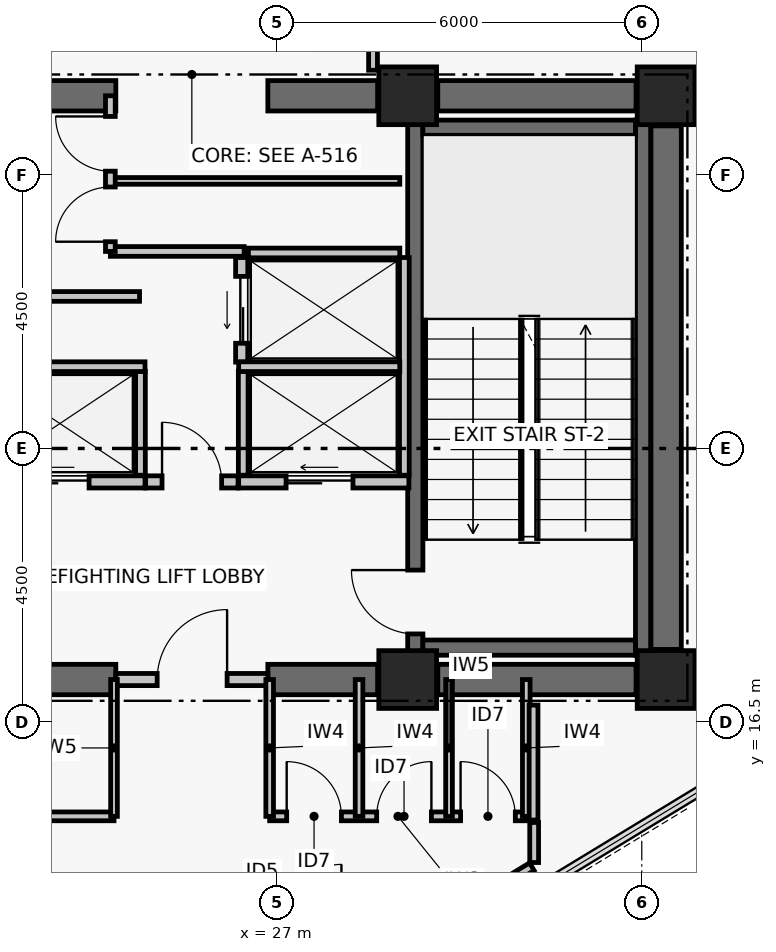
"""IFC4 building model, lengths in metres.
Left out: names, types, materials, properties, quantities, classifications, styles, units other than length and angle.
Written with IfcOpenShell. Run it as: python <this file> out.ifc"""

import sys

from ifc_helpers import new_model, si_unit, direction, frame, frame_2d, origin, origin_2d, place, context, subcontext, project, spatial, rectangle, extrude, element, fill, save


model = new_model("IFC4")
c1 = context("Model", 3, precision=1e-05, world=origin(), true_north=direction((0.0, 1.0)))
c2 = subcontext(c1, "Body", "Model", "MODEL_VIEW")
j1 = project(units=[si_unit("LENGTHUNIT", "METRE"), si_unit("PLANEANGLEUNIT", "RADIAN")], contexts=[c1])
p1 = place(None, origin())
s1 = spatial("IfcSite", under=j1, at=p1, CompositionType="ELEMENT")
p2 = place(p1, origin())
s2 = spatial("IfcBuilding", under=s1, at=p2, CompositionType="ELEMENT")
p3 = place(p2, frame((0.0, 0.0, 219.54)))
s3 = spatial("IfcBuildingStorey", under=s2, at=p3, CompositionType="ELEMENT", Elevation=219.54)
for number, where, z_axis, x_axis in (
    (1, (29.15, 17.2, 0.0), (0.0, 0.0, 1.0), (1.0, 0.0, 0.0)),
    (2, (33.4, 17.2, 0.0), (0.0, 0.0, 1.0), (1.0, 0.0, 0.0)),
    (3, (29.15, 26.8, 0.0), (0.0, 0.0, 1.0), (1.0, 0.0, 0.0)),
    (4, (33.4, 26.8, 0.0), (0.0, 0.0, 1.0), (1.0, 0.0, 0.0)),
):
    element("IfcColumn", number, at=place(p3, frame(where, z_axis=z_axis, x_axis=x_axis)), inside=s3, PredefinedType="COLUMN", context=c2, shape_type="SweptSolid", body=[
        extrude(rectangle(XDim=0.95, YDim=0.95, at=origin_2d()), origin(), (0.0, 0.0, 1.0), 3.72),
    ])
p4 = place(p3, frame((22.545, 17.2, 0.0), z_axis=(0.0, 0.0, 1.0), x_axis=(1.0, 0.0, 0.0)))
e5 = element("IfcWall", 5, at=p4, inside=s3, PredefinedType="SHEAR", context=c2, shape_type="SweptSolid", body=[
    extrude(rectangle(XDim=1.805, YDim=0.5, at=frame_2d((0.903, 0.0))), origin(), (0.0, 0.0, 1.0), 3.5),
])
p5 = place(p3, frame((26.85, 17.2, 0.0), z_axis=(0.0, 0.0, 1.0), x_axis=(1.0, 0.0, 0.0)))
e6 = element("IfcWall", 6, at=p5, inside=s3, PredefinedType="SHEAR", context=c2, shape_type="SweptSolid", body=[
    extrude(rectangle(XDim=1.805, YDim=0.5, at=frame_2d((0.902, 0.0))), origin(), (0.0, 0.0, 1.0), 3.5),
])
p6 = place(p3, frame((29.645, 17.2, 0.0), z_axis=(0.0, 0.0, 1.0), x_axis=(1.0, 0.0, 0.0)))
e7 = element("IfcWall", 7, at=p6, inside=s3, PredefinedType="SHEAR", context=c2, shape_type="SweptSolid", body=[
    extrude(rectangle(XDim=3.26, YDim=0.5, at=frame_2d((1.63, 0.0))), origin(), (0.0, 0.0, 1.0), 3.5),
])
p7 = place(p3, frame((22.545, 26.8, 0.0), z_axis=(0.0, 0.0, 1.0), x_axis=(1.0, 0.0, 0.0)))
e8 = element("IfcWall", 8, at=p7, inside=s3, PredefinedType="SHEAR", context=c2, shape_type="SweptSolid", body=[
    extrude(rectangle(XDim=1.805, YDim=0.5, at=frame_2d((0.903, 0.0))), origin(), (0.0, 0.0, 1.0), 3.5),
])
p8 = place(p3, frame((26.85, 26.8, 0.0), z_axis=(0.0, 0.0, 1.0), x_axis=(1.0, 0.0, 0.0)))
e9 = element("IfcWall", 9, at=p8, inside=s3, PredefinedType="SHEAR", context=c2, shape_type="SweptSolid", body=[
    extrude(rectangle(XDim=1.805, YDim=0.5, at=frame_2d((0.902, 0.0))), origin(), (0.0, 0.0, 1.0), 3.5),
])
p9 = place(p3, frame((29.645, 26.8, 0.0), z_axis=(0.0, 0.0, 1.0), x_axis=(1.0, 0.0, 0.0)))
e10 = element("IfcWall", 10, at=p9, inside=s3, PredefinedType="SHEAR", context=c2, shape_type="SweptSolid", body=[
    extrude(rectangle(XDim=3.26, YDim=0.5, at=frame_2d((1.63, 0.0))), origin(), (0.0, 0.0, 1.0), 3.5),
])
p10 = place(p3, frame((33.4, 17.695, 0.0), z_axis=(0.0, 0.0, 1.0), x_axis=(0.0, 1.0, 0.0)))
e11 = element("IfcWall", 11, at=p10, inside=s3, PredefinedType="SHEAR", context=c2, shape_type="SweptSolid", body=[
    extrude(rectangle(XDim=8.61, YDim=0.5, at=frame_2d((4.305, 0.0))), origin(), (0.0, 0.0, 1.0), 3.5),
])
p11 = place(p3, frame((29.275, 17.6, 0.0), z_axis=(0.0, 0.0, 1.0), x_axis=(0.0, 1.0, 0.0)))
e12 = element("IfcWall", 12, at=p11, inside=s3, PredefinedType="SHEAR", context=c2, shape_type="SweptSolid", body=[
    extrude(rectangle(XDim=8.8, YDim=0.25, at=frame_2d((4.4, 0.0))), origin(), (0.0, 0.0, 1.0), 3.5),
])
p12 = place(p11, frame((0.35, 0.0, 0.0)))
e13 = element("IfcOpeningElement", 13, at=p12, cuts=e12, PredefinedType="OPENING", context=c2, shape_type="SweptSolid", body=[
    extrude(rectangle(XDim=1.05, YDim=2.08, at=frame_2d((0.525, 1.04))), frame((0.0, 0.135, 0.0), z_axis=(0.0, -1.0, 0.0), x_axis=(1.0, 0.0, 0.0)), (0.0, 0.0, 1.0), 0.27),
])
p13 = place(p3, frame((33.021, 17.6, 0.0), z_axis=(0.0, 0.0, 1.0), x_axis=(0.0, 1.0, 0.0)))
e14 = element("IfcWall", 14, at=p13, inside=s3, PredefinedType="SHEAR", context=c2, shape_type="SweptSolid", body=[
    extrude(rectangle(XDim=8.8, YDim=0.25, at=frame_2d((4.4, 0.0))), origin(), (0.0, 0.0, 1.0), 3.5),
])
for number, where, z_axis, x_axis in (
    (15, (29.4, 17.725, 0.0), (0.0, 0.0, 1.0), (1.0, 0.0, 0.0)),
    (16, (29.4, 26.275, 0.0), (0.0, 0.0, 1.0), (1.0, 0.0, 0.0)),
):
    element("IfcWall", number, at=place(p3, frame(where, z_axis=z_axis, x_axis=x_axis)), inside=s3, PredefinedType="SHEAR", context=c2, shape_type="SweptSolid", body=[
        extrude(rectangle(XDim=3.496, YDim=0.25, at=frame_2d((1.748, 0.0))), origin(), (0.0, 0.0, 1.0), 3.5),
    ])
p14 = place(p3, frame((24.35, 17.2, 0.0), z_axis=(0.0, 0.0, 1.0), x_axis=(1.0, 0.0, 0.0)))
e17 = element("IfcWall", 17, at=p14, inside=s3, PredefinedType="PARTITIONING", context=c2, shape_type="SweptSolid", body=[
    extrude(rectangle(XDim=2.5, YDim=0.2, at=frame_2d((1.25, 0.0))), origin(), (0.0, 0.0, 1.0), 2.63),
])
p15 = place(p14, frame((0.68, 0.0, 0.0)))
e18 = element("IfcOpeningElement", 18, at=p15, cuts=e17, PredefinedType="OPENING", context=c2, shape_type="SweptSolid", body=[
    extrude(rectangle(XDim=1.15, YDim=2.08, at=frame_2d((0.575, 1.04))), frame((0.0, 0.11, 0.0), z_axis=(0.0, -1.0, 0.0), x_axis=(1.0, 0.0, 0.0)), (0.0, 0.0, 1.0), 0.22),
])
p16 = place(p3, frame((24.84, 20.45, 0.0), z_axis=(0.0, 0.0, 1.0), x_axis=(1.0, 0.0, 0.0)))
e19 = element("IfcWall", 19, at=p16, inside=s3, PredefinedType="PARTITIONING", context=c2, shape_type="SweptSolid", body=[
    extrude(rectangle(XDim=1.52, YDim=0.2, at=frame_2d((0.76, 0.0))), origin(), (0.0, 0.0, 1.0), 3.5),
])
p17 = place(p16, frame((0.27, 0.0, 0.0)))
e20 = element("IfcOpeningElement", 20, at=p17, cuts=e19, PredefinedType="OPENING", context=c2, shape_type="SweptSolid", body=[
    extrude(rectangle(XDim=0.98, YDim=2.06, at=frame_2d((0.49, 1.03))), frame((0.0, 0.11, 0.0), z_axis=(0.0, -1.0, 0.0), x_axis=(1.0, 0.0, 0.0)), (0.0, 0.0, 1.0), 0.22),
])
p18 = place(p3, frame((22.03, 20.45, 0.0), z_axis=(0.0, 0.0, 1.0), x_axis=(1.0, 0.0, 0.0)))
e21 = element("IfcWall", 21, at=p18, inside=s3, PredefinedType="PARTITIONING", context=c2, shape_type="SweptSolid", body=[
    extrude(rectangle(XDim=2.8, YDim=0.2, at=frame_2d((1.4, 0.0))), origin(), (0.0, 0.0, 1.0), 3.5),
])
p19 = place(p18, frame((0.78, 0.0, 0.0)))
e22 = element("IfcOpeningElement", 22, at=p19, cuts=e21, PredefinedType="OPENING", context=c2, shape_type="SweptSolid", body=[
    extrude(rectangle(XDim=1.1, YDim=2.08, at=frame_2d((0.55, 1.04))), frame((0.0, 0.11, 0.0), z_axis=(0.0, -1.0, 0.0), x_axis=(1.0, 0.0, 0.0)), (0.0, 0.0, 1.0), 0.22),
])
p20 = place(p3, frame((26.37, 20.45, 0.0), z_axis=(0.0, 0.0, 1.0), x_axis=(1.0, 0.0, 0.0)))
e23 = element("IfcWall", 23, at=p20, inside=s3, PredefinedType="PARTITIONING", context=c2, shape_type="SweptSolid", body=[
    extrude(rectangle(XDim=2.8, YDim=0.2, at=frame_2d((1.4, 0.0))), origin(), (0.0, 0.0, 1.0), 3.5),
])
p21 = place(p20, frame((0.78, 0.0, 0.0)))
e24 = element("IfcOpeningElement", 24, at=p21, cuts=e23, PredefinedType="OPENING", context=c2, shape_type="SweptSolid", body=[
    extrude(rectangle(XDim=1.1, YDim=2.08, at=frame_2d((0.55, 1.04))), frame((0.0, 0.11, 0.0), z_axis=(0.0, -1.0, 0.0), x_axis=(1.0, 0.0, 0.0)), (0.0, 0.0, 1.0), 0.22),
])
p22 = place(p3, frame((26.42, 22.42, 0.0), z_axis=(0.0, 0.0, 1.0), x_axis=(0.0, 1.0, 0.0)))
e25 = element("IfcWall", 25, at=p22, inside=s3, PredefinedType="PARTITIONING", context=c2, shape_type="SweptSolid", body=[
    extrude(rectangle(XDim=1.72, YDim=0.2, at=frame_2d((0.86, 0.0))), origin(), (0.0, 0.0, 1.0), 3.5),
])
p23 = place(p22, frame((0.31, 0.0, 0.0)))
e26 = element("IfcOpeningElement", 26, at=p23, cuts=e25, PredefinedType="OPENING", context=c2, shape_type="SweptSolid", body=[
    extrude(rectangle(XDim=1.1, YDim=2.08, at=frame_2d((0.55, 1.04))), frame((0.0, 0.11, 0.0), z_axis=(0.0, -1.0, 0.0), x_axis=(1.0, 0.0, 0.0)), (0.0, 0.0, 1.0), 0.22),
])
p24 = place(p3, frame((24.755, 20.56, 0.0), z_axis=(0.0, 0.0, 1.0), x_axis=(0.0, 1.0, 0.0)))
e27 = element("IfcWall", 27, at=p24, inside=s3, PredefinedType="PARTITIONING", context=c2, shape_type="SweptSolid", body=[
    extrude(rectangle(XDim=1.71, YDim=0.16, at=frame_2d((0.855, 0.0))), origin(), (0.0, 0.0, 1.0), 3.5),
])
p25 = place(p3, frame((22.18, 22.345, 0.0), z_axis=(0.0, 0.0, 1.0), x_axis=(1.0, 0.0, 0.0)))
e28 = element("IfcWall", 28, at=p25, inside=s3, PredefinedType="PARTITIONING", context=c2, shape_type="SweptSolid", body=[
    extrude(rectangle(XDim=2.65, YDim=0.16, at=frame_2d((1.325, 0.0))), origin(), (0.0, 0.0, 1.0), 3.5),
])
p26 = place(p3, frame((29.095, 20.56, 0.0), z_axis=(0.0, 0.0, 1.0), x_axis=(0.0, 1.0, 0.0)))
e29 = element("IfcWall", 29, at=p26, inside=s3, PredefinedType="PARTITIONING", context=c2, shape_type="SweptSolid", body=[
    extrude(rectangle(XDim=3.58, YDim=0.16, at=frame_2d((1.79, 0.0))), origin(), (0.0, 0.0, 1.0), 3.5),
])
p27 = place(p3, frame((26.445, 20.56, 0.0), z_axis=(0.0, 0.0, 1.0), x_axis=(0.0, 1.0, 0.0)))
e30 = element("IfcWall", 30, at=p27, inside=s3, PredefinedType="PARTITIONING", context=c2, shape_type="SweptSolid", body=[
    extrude(rectangle(XDim=1.71, YDim=0.16, at=frame_2d((0.855, 0.0))), origin(), (0.0, 0.0, 1.0), 3.5),
])
p28 = place(p3, frame((26.37, 22.345, 0.0), z_axis=(0.0, 0.0, 1.0), x_axis=(1.0, 0.0, 0.0)))
e31 = element("IfcWall", 31, at=p28, inside=s3, PredefinedType="PARTITIONING", context=c2, shape_type="SweptSolid", body=[
    extrude(rectangle(XDim=2.65, YDim=0.16, at=frame_2d((1.325, 0.0))), origin(), (0.0, 0.0, 1.0), 3.5),
])
p29 = place(p3, frame((26.53, 24.215, 0.0), z_axis=(0.0, 0.0, 1.0), x_axis=(1.0, 0.0, 0.0)))
e32 = element("IfcWall", 32, at=p29, inside=s3, PredefinedType="PARTITIONING", context=c2, shape_type="SweptSolid", body=[
    extrude(rectangle(XDim=2.49, YDim=0.16, at=frame_2d((1.245, 0.0))), origin(), (0.0, 0.0, 1.0), 3.5),
])
p30 = place(p3, frame((23.04, 23.5, 0.0), z_axis=(0.0, 0.0, 1.0), x_axis=(1.0, 0.0, 0.0)))
e33 = element("IfcWall", 33, at=p30, inside=s3, PredefinedType="PARTITIONING", context=c2, shape_type="SweptSolid", body=[
    extrude(rectangle(XDim=1.7, YDim=0.16, at=frame_2d((0.85, 0.0))), origin(), (0.0, 0.0, 1.0), 3.5),
])
p31 = place(p3, frame((24.26, 24.24, 0.0), z_axis=(0.0, 0.0, 1.0), x_axis=(1.0, 0.0, 0.0)))
e34 = element("IfcWall", 34, at=p31, inside=s3, PredefinedType="PARTITIONING", context=c2, shape_type="SweptSolid", body=[
    extrude(rectangle(XDim=2.2, YDim=0.16, at=frame_2d((1.1, 0.0))), origin(), (0.0, 0.0, 1.0), 3.5),
])
p32 = place(p3, frame((24.26, 25.4, 0.0), z_axis=(0.0, 0.0, 1.0), x_axis=(1.0, 0.0, 0.0)))
e35 = element("IfcWall", 35, at=p32, inside=s3, PredefinedType="PARTITIONING", context=c2, shape_type="SweptSolid", body=[
    extrude(rectangle(XDim=4.76, YDim=0.11, at=frame_2d((2.38, 0.0))), origin(), (0.0, 0.0, 1.0), 3.5),
])
p33 = place(p3, frame((24.26, 24.24, 0.0), z_axis=(0.0, 0.0, 1.0), x_axis=(0.0, 1.0, 0.0)))
e36 = element("IfcWall", 36, at=p33, inside=s3, PredefinedType="PARTITIONING", context=c2, shape_type="SweptSolid", body=[
    extrude(rectangle(XDim=2.56, YDim=0.16, at=frame_2d((1.28, 0.0))), origin(), (0.0, 0.0, 1.0), 2.63),
])
p34 = place(p33, frame((0.16, 0.0, 0.0)))
e37 = element("IfcOpeningElement", 37, at=p34, cuts=e36, PredefinedType="OPENING", context=c2, shape_type="SweptSolid", body=[
    extrude(rectangle(XDim=0.9, YDim=2.02, at=frame_2d((0.45, 1.01))), frame((0.0, 0.09, 0.0), z_axis=(0.0, -1.0, 0.0), x_axis=(1.0, 0.0, 0.0)), (0.0, 0.0, 1.0), 0.18),
])
p35 = place(p33, frame((1.32, 0.0, 0.0)))
e38 = element("IfcOpeningElement", 38, at=p35, cuts=e36, PredefinedType="OPENING", context=c2, shape_type="SweptSolid", body=[
    extrude(rectangle(XDim=0.9, YDim=2.02, at=frame_2d((0.45, 1.01))), frame((0.0, 0.09, 0.0), z_axis=(0.0, -1.0, 0.0), x_axis=(1.0, 0.0, 0.0)), (0.0, 0.0, 1.0), 0.18),
])
p36 = place(p3, frame((19.1, 14.95, 0.0), z_axis=(0.0, 0.0, 1.0), x_axis=(1.0, 0.0, 0.0)))
e39 = element("IfcWall", 39, at=p36, inside=s3, PredefinedType="PARTITIONING", context=c2, shape_type="SweptSolid", body=[
    extrude(rectangle(XDim=5.22, YDim=0.145, at=frame_2d((2.61, 0.0))), origin(), (0.0, 0.0, 1.0), 2.78),
])
p37 = place(p36, frame((0.2, 0.0, 0.0)))
e40 = element("IfcOpeningElement", 40, at=p37, cuts=e39, PredefinedType="OPENING", context=c2, shape_type="SweptSolid", body=[
    extrude(rectangle(XDim=0.9, YDim=2.02, at=frame_2d((0.45, 1.01))), frame((0.0, 0.083, 0.0), z_axis=(0.0, -1.0, 0.0), x_axis=(1.0, 0.0, 0.0)), (0.0, 0.0, 1.0), 0.165),
])
p38 = place(p36, frame((2.785, 0.0, 0.0)))
e41 = element("IfcOpeningElement", 41, at=p38, cuts=e39, PredefinedType="OPENING", context=c2, shape_type="SweptSolid", body=[
    extrude(rectangle(XDim=0.95, YDim=2.06, at=frame_2d((0.475, 1.03))), frame((0.0, 0.083, 0.0), z_axis=(0.0, -1.0, 0.0), x_axis=(1.0, 0.0, 0.0)), (0.0, 0.0, 1.0), 0.165),
])
p39 = place(p3, frame((26.88, 14.95, 0.0), z_axis=(0.0, 0.0, 1.0), x_axis=(1.0, 0.0, 0.0)))
e42 = element("IfcWall", 42, at=p39, inside=s3, PredefinedType="PARTITIONING", context=c2, shape_type="SweptSolid", body=[
    extrude(rectangle(XDim=4.22, YDim=0.145, at=frame_2d((2.11, 0.0))), origin(), (0.0, 0.0, 1.0), 2.98),
])
p40 = place(p39, frame((0.28, 0.0, 0.0)))
e43 = element("IfcOpeningElement", 43, at=p40, cuts=e42, PredefinedType="OPENING", context=c2, shape_type="SweptSolid", body=[
    extrude(rectangle(XDim=0.9, YDim=2.02, at=frame_2d((0.45, 1.01))), frame((0.0, 0.083, 0.0), z_axis=(0.0, -1.0, 0.0), x_axis=(1.0, 0.0, 0.0)), (0.0, 0.0, 1.0), 0.165),
])
p41 = place(p39, frame((1.76, 0.0, 0.0)))
e44 = element("IfcOpeningElement", 44, at=p41, cuts=e42, PredefinedType="OPENING", context=c2, shape_type="SweptSolid", body=[
    extrude(rectangle(XDim=0.9, YDim=2.02, at=frame_2d((0.45, 1.01))), frame((0.0, 0.083, 0.0), z_axis=(0.0, -1.0, 0.0), x_axis=(1.0, 0.0, 0.0)), (0.0, 0.0, 1.0), 0.165),
])
p42 = place(p39, frame((3.14, 0.0, 0.0)))
e45 = element("IfcOpeningElement", 45, at=p42, cuts=e42, PredefinedType="OPENING", context=c2, shape_type="SweptSolid", body=[
    extrude(rectangle(XDim=0.9, YDim=2.02, at=frame_2d((0.45, 1.01))), frame((0.0, 0.083, 0.0), z_axis=(0.0, -1.0, 0.0), x_axis=(1.0, 0.0, 0.0)), (0.0, 0.0, 1.0), 0.165),
])
p43 = place(p3, frame((24.32, 14.95, 0.0), z_axis=(0.0, 0.0, 1.0), x_axis=(0.0, 1.0, 0.0)))
e46 = element("IfcWall", 46, at=p43, inside=s3, PredefinedType="PARTITIONING", context=c2, shape_type="SweptSolid", body=[
    extrude(rectangle(XDim=2.25, YDim=0.11, at=frame_2d((1.125, 0.0))), origin(), (0.0, 0.0, 1.0), 2.63),
])
for number, where, z_axis, x_axis in (
    (47, (26.88, 14.95, 0.0), (0.0, 0.0, 1.0), (0.0, 1.0, 0.0)),
    (48, (28.35, 14.95, 0.0), (0.0, 0.0, 1.0), (0.0, 1.0, 0.0)),
):
    element("IfcWall", number, at=place(p3, frame(where, z_axis=z_axis, x_axis=x_axis)), inside=s3, PredefinedType="PARTITIONING", context=c2, shape_type="SweptSolid", body=[
        extrude(rectangle(XDim=2.25, YDim=0.125, at=frame_2d((1.125, 0.0))), origin(), (0.0, 0.0, 1.0), 2.63),
    ])
p44 = place(p3, frame((29.83, 14.95, 0.0), z_axis=(0.0, 0.0, 1.0), x_axis=(0.0, 1.0, 0.0)))
e49 = element("IfcWall", 49, at=p44, inside=s3, PredefinedType="PARTITIONING", context=c2, shape_type="SweptSolid", body=[
    extrude(rectangle(XDim=2.25, YDim=0.11, at=frame_2d((1.125, 0.0))), origin(), (0.0, 0.0, 1.0), 2.63),
])
p45 = place(p3, frame((31.1, 14.95, 0.0), z_axis=(0.0, 0.0, 1.0), x_axis=(0.0, 1.0, 0.0)))
e50 = element("IfcWall", 50, at=p45, inside=s3, PredefinedType="PARTITIONING", context=c2, shape_type="SweptSolid", body=[
    extrude(rectangle(XDim=2.25, YDim=0.125, at=frame_2d((1.125, 0.0))), origin(), (0.0, 0.0, 1.0), 2.63),
])
p46 = place(p3, frame((29.709, 13.222, 0.0), z_axis=(0.0, 0.0, 1.0), x_axis=(0.854635840942, 0.519227868451, 0.0)))
e51 = element("IfcWall", 51, at=p46, inside=s3, PredefinedType="PARTITIONING", context=c2, shape_type="SweptSolid", body=[
    extrude(rectangle(XDim=1.735, YDim=0.145, at=frame_2d((0.867, 0.0))), origin(), (0.0, 0.0, 1.0), 3.5),
])
p47 = place(p3, frame((31.23, 14.191, 0.0), z_axis=(0.0, 0.0, 1.0), x_axis=(0.0, 1.0, 0.0)))
e52 = element("IfcWall", 52, at=p47, inside=s3, PredefinedType="PARTITIONING", context=c2, shape_type="SweptSolid", body=[
    extrude(rectangle(XDim=0.659, YDim=0.145, at=frame_2d((0.33, 0.0))), origin(), (0.0, 0.0, 1.0), 3.5),
])
p48 = place(p3, frame((31.22, 14.889, 0.0), z_axis=(0.0, 0.0, 1.0), x_axis=(0.0, 1.0, 0.0)))
e53 = element("IfcWall", 53, at=p48, inside=s3, PredefinedType="PARTITIONING", context=c2, shape_type="SweptSolid", body=[
    extrude(rectangle(XDim=1.891, YDim=0.145, at=frame_2d((0.946, 0.0))), origin(), (0.0, 0.0, 1.0), 2.63),
])
p49 = place(p3, frame((28.58, 27.22, 0.0), z_axis=(0.0, 0.0, 1.0), x_axis=(0.0, 1.0, 0.0)))
e54 = element("IfcWall", 54, at=p49, inside=s3, PredefinedType="PARTITIONING", context=c2, shape_type="SweptSolid", body=[
    extrude(rectangle(XDim=1.48, YDim=0.145, at=frame_2d((0.74, 0.0))), origin(), (0.0, 0.0, 1.0), 2.63),
])
p50 = place(p12, origin())
e55 = element("IfcDoor", 55, at=p50, inside=s3, OperationType="SINGLE_SWING_RIGHT", PredefinedType="DOOR", context=c2, shape_type="SweptSolid", body=[
    extrude(rectangle(XDim=1.05, YDim=2.08, at=frame_2d((0.525, 1.04))), frame((0.0, 0.025, 0.0), z_axis=(0.0, -1.0, 0.0), x_axis=(1.0, 0.0, 0.0)), (0.0, 0.0, 1.0), 0.05),
])
fill(e13, e55)
p51 = place(p15, origin())
e56 = element("IfcDoor", 56, at=p51, inside=s3, OperationType="SINGLE_SWING_RIGHT", PredefinedType="DOOR", context=c2, shape_type="SweptSolid", body=[
    extrude(rectangle(XDim=1.15, YDim=2.08, at=frame_2d((0.575, 1.04))), frame((0.0, 0.025, 0.0), z_axis=(0.0, -1.0, 0.0), x_axis=(1.0, 0.0, 0.0)), (0.0, 0.0, 1.0), 0.05),
])
fill(e18, e56)
p52 = place(p17, origin())
e57 = element("IfcDoor", 57, at=p52, inside=s3, OperationType="SINGLE_SWING_LEFT", PredefinedType="DOOR", context=c2, shape_type="SweptSolid", body=[
    extrude(rectangle(XDim=0.98, YDim=2.06, at=frame_2d((0.49, 1.03))), frame((0.0, 0.025, 0.0), z_axis=(0.0, -1.0, 0.0), x_axis=(1.0, 0.0, 0.0)), (0.0, 0.0, 1.0), 0.05),
])
fill(e20, e57)
p53 = place(p19, origin())
e58 = element("IfcDoor", 58, at=p53, inside=s3, OperationType="DOUBLE_DOOR_SLIDING", PredefinedType="DOOR", context=c2, shape_type="SweptSolid", body=[
    extrude(rectangle(XDim=1.1, YDim=2.08, at=frame_2d((0.55, 1.04))), frame((0.0, 0.025, 0.0), z_axis=(0.0, -1.0, 0.0), x_axis=(1.0, 0.0, 0.0)), (0.0, 0.0, 1.0), 0.05),
])
fill(e22, e58)
p54 = place(p21, origin())
e59 = element("IfcDoor", 59, at=p54, inside=s3, OperationType="DOUBLE_DOOR_SLIDING", PredefinedType="DOOR", context=c2, shape_type="SweptSolid", body=[
    extrude(rectangle(XDim=1.1, YDim=2.08, at=frame_2d((0.55, 1.04))), frame((0.0, 0.025, 0.0), z_axis=(0.0, -1.0, 0.0), x_axis=(1.0, 0.0, 0.0)), (0.0, 0.0, 1.0), 0.05),
])
fill(e24, e59)
p55 = place(p23, origin())
e60 = element("IfcDoor", 60, at=p55, inside=s3, OperationType="DOUBLE_DOOR_SLIDING", PredefinedType="DOOR", context=c2, shape_type="SweptSolid", body=[
    extrude(rectangle(XDim=1.1, YDim=2.08, at=frame_2d((0.55, 1.04))), frame((0.0, 0.025, 0.0), z_axis=(0.0, -1.0, 0.0), x_axis=(1.0, 0.0, 0.0)), (0.0, 0.0, 1.0), 0.05),
])
fill(e26, e60)
p56 = place(p34, origin())
e61 = element("IfcDoor", 61, at=p56, inside=s3, OperationType="SINGLE_SWING_LEFT", PredefinedType="DOOR", context=c2, shape_type="SweptSolid", body=[
    extrude(rectangle(XDim=0.9, YDim=2.02, at=frame_2d((0.45, 1.01))), frame((0.0, 0.025, 0.0), z_axis=(0.0, -1.0, 0.0), x_axis=(1.0, 0.0, 0.0)), (0.0, 0.0, 1.0), 0.05),
])
fill(e37, e61)
p57 = place(p35, origin())
e62 = element("IfcDoor", 62, at=p57, inside=s3, OperationType="SINGLE_SWING_RIGHT", PredefinedType="DOOR", context=c2, shape_type="SweptSolid", body=[
    extrude(rectangle(XDim=0.9, YDim=2.02, at=frame_2d((0.45, 1.01))), frame((0.0, 0.025, 0.0), z_axis=(0.0, -1.0, 0.0), x_axis=(1.0, 0.0, 0.0)), (0.0, 0.0, 1.0), 0.05),
])
fill(e38, e62)
p58 = place(p40, origin())
e63 = element("IfcDoor", 63, at=p58, inside=s3, OperationType="SINGLE_SWING_LEFT", PredefinedType="DOOR", context=c2, shape_type="SweptSolid", body=[
    extrude(rectangle(XDim=0.9, YDim=2.02, at=frame_2d((0.45, 1.01))), frame((0.0, 0.025, 0.0), z_axis=(0.0, -1.0, 0.0), x_axis=(1.0, 0.0, 0.0)), (0.0, 0.0, 1.0), 0.05),
])
fill(e43, e63)
p59 = place(p41, origin())
e64 = element("IfcDoor", 64, at=p59, inside=s3, OperationType="SINGLE_SWING_RIGHT", PredefinedType="DOOR", context=c2, shape_type="SweptSolid", body=[
    extrude(rectangle(XDim=0.9, YDim=2.02, at=frame_2d((0.45, 1.01))), frame((0.0, 0.025, 0.0), z_axis=(0.0, -1.0, 0.0), x_axis=(1.0, 0.0, 0.0)), (0.0, 0.0, 1.0), 0.05),
])
fill(e44, e64)
p60 = place(p42, origin())
e65 = element("IfcDoor", 65, at=p60, inside=s3, OperationType="SINGLE_SWING_LEFT", PredefinedType="DOOR", context=c2, shape_type="SweptSolid", body=[
    extrude(rectangle(XDim=0.9, YDim=2.02, at=frame_2d((0.45, 1.01))), frame((0.0, 0.025, 0.0), z_axis=(0.0, -1.0, 0.0), x_axis=(1.0, 0.0, 0.0)), (0.0, 0.0, 1.0), 0.05),
])
fill(e45, e65)
save(model, sys.argv[1])
